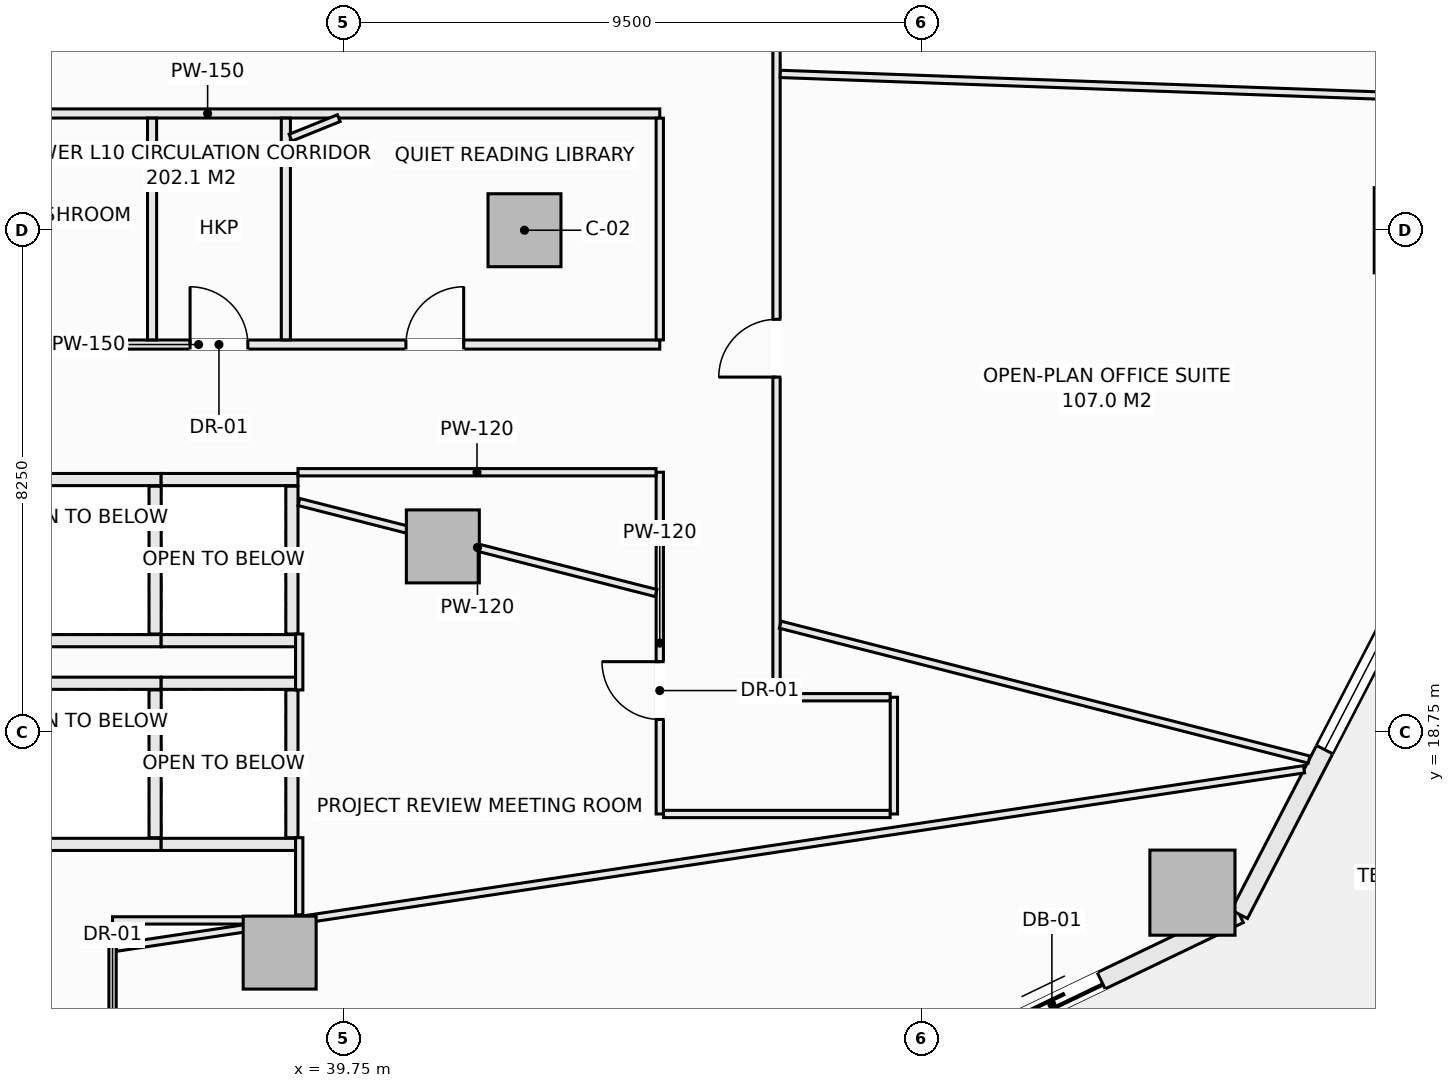
"""IFC4 building model, lengths in metres.
Left out: names, types, materials, properties, quantities, classifications, styles, units other than length and angle.
Written with IfcOpenShell. Run it as: python <this file> out.ifc"""

import sys

from ifc_helpers import new_model, si_unit, direction, frame, frame_2d, origin, origin_2d, place, context, subcontext, project, spatial, rectangle, extrude, element, fill, save


model = new_model("IFC4")
c1 = context("Model", 3, precision=1e-05, world=origin(), true_north=direction((0.0, 1.0)))
c2 = subcontext(c1, "Body", "Model", "MODEL_VIEW")
j1 = project(units=[si_unit("LENGTHUNIT", "METRE"), si_unit("PLANEANGLEUNIT", "RADIAN")], contexts=[c1])
p1 = place(None, origin())
s1 = spatial("IfcSite", under=j1, at=p1, CompositionType="ELEMENT")
p2 = place(p1, origin())
s2 = spatial("IfcBuilding", under=s1, at=p2, CompositionType="ELEMENT")
p3 = place(p2, frame((0.0, 0.0, 45.75)))
s3 = spatial("IfcBuildingStorey", under=s2, at=p3, CompositionType="ELEMENT", Elevation=45.75)
for number, where, z_axis, x_axis in (
    (1, (57.4, 27.0, -0.28), (0.0, 0.0, 1.0), (1.0, 0.0, 0.0)),
    (2, (53.71, 16.106, -0.28), (0.0, 0.0, 1.0), (1.0, 0.0, 0.0)),
):
    element("IfcColumn", number, at=place(p3, frame(where, z_axis=z_axis, x_axis=x_axis)), inside=s3, PredefinedType="COLUMN", context=c2, shape_type="SweptSolid", body=[
        extrude(rectangle(XDim=1.4, YDim=1.4, at=origin_2d()), origin(), (0.0, 0.0, 1.0), 3.85),
    ])
for number, where, z_axis, x_axis in (
    (3, (42.725, 27.0, -0.28), (0.0, 0.0, 1.0), (1.0, 0.0, 0.0)),
    (4, (38.698, 15.121, -0.28), (0.0, 0.0, 1.0), (1.0, 0.0, 0.0)),
    (5, (41.382, 21.801, -0.28), (0.0, 0.0, 1.0), (1.0, 0.0, 0.0)),
):
    element("IfcColumn", number, at=place(p3, frame(where, z_axis=z_axis, x_axis=x_axis)), inside=s3, PredefinedType="COLUMN", context=c2, shape_type="SweptSolid", body=[
        extrude(rectangle(XDim=1.2, YDim=1.2, at=origin_2d()), origin(), (0.0, 0.0, 1.0), 3.85),
    ])
p4 = place(p3, frame((48.315, 12.787, 0.0), z_axis=(0.0, 0.0, 1.0), x_axis=(0.901360393999, 0.433069786673, 0.0)))
e6 = element("IfcWall", 6, at=p4, inside=s3, PredefinedType="SOLIDWALL", context=c2, shape_type="SweptSolid", body=[
    extrude(rectangle(XDim=6.842, YDim=0.3, at=frame_2d((3.421, 0.0))), origin(), (0.0, 0.0, 1.0), 3.093),
])
p5 = place(p4, frame((2.521, 0.0, 0.0)))
e7 = element("IfcOpeningElement", 7, at=p5, cuts=e6, PredefinedType="OPENING", context=c2, shape_type="SweptSolid", body=[
    extrude(rectangle(XDim=1.8, YDim=2.25, at=frame_2d((0.9, 1.125))), frame((0.0, 0.16, 0.0), z_axis=(0.0, -1.0, 0.0), x_axis=(1.0, 0.0, 0.0)), (0.0, 0.0, 1.0), 0.32),
])
p6 = place(p3, frame((54.482, 15.75, 0.0), z_axis=(0.0, 0.0, 1.0), x_axis=(0.459809804413, 0.88801742312, 0.0)))
e8 = element("IfcWall", 8, at=p6, inside=s3, PredefinedType="SOLIDWALL", context=c2, shape_type="SweptSolid", body=[
    extrude(rectangle(XDim=6.111, YDim=0.3, at=frame_2d((3.055, 0.0))), origin(), (0.0, 0.0, 1.0), 3.093),
])
p7 = place(p6, frame((3.05, 0.0, 0.85)))
e9 = element("IfcOpeningElement", 9, at=p7, cuts=e8, PredefinedType="OPENING", context=c2, shape_type="SweptSolid", body=[
    extrude(rectangle(XDim=2.4, YDim=1.9, at=frame_2d((1.2, 0.95))), frame((0.0, 0.16, 0.0), z_axis=(0.0, -1.0, 0.0), x_axis=(1.0, 0.0, 0.0)), (0.0, 0.0, 1.0), 0.32),
])
p8 = place(p3, frame((50.959, 10.678, 0.0), z_axis=(0.0, 0.0, 1.0), x_axis=(0.873500119739, 0.48682393205, 0.0)))
e10 = element("IfcWall", 10, at=p8, inside=s3, PredefinedType="PARAPET", context=c2, shape_type="SweptSolid", body=[
    extrude(rectangle(XDim=7.562, YDim=0.22, at=frame_2d((3.781, 0.0))), origin(), (0.0, 0.0, 1.0), 0.52),
])
for number, where, z_axis, x_axis in (
    (11, (34.5, 19.55, 0.0), (0.0, 0.0, 1.0), (1.0, 0.0, 0.0)),
    (12, (34.5, 16.9, 0.0), (0.0, 0.0, 1.0), (1.0, 0.0, 0.0)),
):
    element("IfcWall", number, at=place(p3, frame(where, z_axis=z_axis, x_axis=x_axis)), inside=s3, PredefinedType="SOLIDWALL", context=c2, shape_type="SweptSolid", body=[
        extrude(rectangle(XDim=2.25, YDim=0.2, at=frame_2d((1.125, 0.0))), origin(), (0.0, 0.0, 1.0), 3.57),
    ])
p9 = place(p3, frame((36.65, 17.01, 0.0), z_axis=(0.0, 0.0, 1.0), x_axis=(0.0, 1.0, 0.0)))
e13 = element("IfcWall", 13, at=p9, inside=s3, PredefinedType="SOLIDWALL", context=c2, shape_type="SweptSolid", body=[
    extrude(rectangle(XDim=2.43, YDim=0.2, at=frame_2d((1.215, 0.0))), origin(), (0.0, 0.0, 1.0), 3.57),
])
for number, where, z_axis, x_axis in (
    (14, (36.75, 19.55, 0.0), (0.0, 0.0, 1.0), (1.0, 0.0, 0.0)),
    (15, (36.75, 16.9, 0.0), (0.0, 0.0, 1.0), (1.0, 0.0, 0.0)),
):
    element("IfcWall", number, at=place(p3, frame(where, z_axis=z_axis, x_axis=x_axis)), inside=s3, PredefinedType="SOLIDWALL", context=c2, shape_type="SweptSolid", body=[
        extrude(rectangle(XDim=2.25, YDim=0.2, at=frame_2d((1.125, 0.0))), origin(), (0.0, 0.0, 1.0), 3.57),
    ])
p10 = place(p3, frame((38.9, 17.01, 0.0), z_axis=(0.0, 0.0, 1.0), x_axis=(0.0, 1.0, 0.0)))
e16 = element("IfcWall", 16, at=p10, inside=s3, PredefinedType="SOLIDWALL", context=c2, shape_type="SweptSolid", body=[
    extrude(rectangle(XDim=2.43, YDim=0.2, at=frame_2d((1.215, 0.0))), origin(), (0.0, 0.0, 1.0), 3.57),
])
for number, where, z_axis, x_axis in (
    (17, (34.5, 22.9, 0.0), (0.0, 0.0, 1.0), (1.0, 0.0, 0.0)),
    (18, (34.5, 20.25, 0.0), (0.0, 0.0, 1.0), (1.0, 0.0, 0.0)),
):
    element("IfcWall", number, at=place(p3, frame(where, z_axis=z_axis, x_axis=x_axis)), inside=s3, PredefinedType="SOLIDWALL", context=c2, shape_type="SweptSolid", body=[
        extrude(rectangle(XDim=2.25, YDim=0.2, at=frame_2d((1.125, 0.0))), origin(), (0.0, 0.0, 1.0), 3.57),
    ])
p11 = place(p3, frame((36.65, 20.36, 0.0), z_axis=(0.0, 0.0, 1.0), x_axis=(0.0, 1.0, 0.0)))
e19 = element("IfcWall", 19, at=p11, inside=s3, PredefinedType="SOLIDWALL", context=c2, shape_type="SweptSolid", body=[
    extrude(rectangle(XDim=2.43, YDim=0.2, at=frame_2d((1.215, 0.0))), origin(), (0.0, 0.0, 1.0), 3.57),
])
for number, where, z_axis, x_axis in (
    (20, (36.75, 22.9, 0.0), (0.0, 0.0, 1.0), (1.0, 0.0, 0.0)),
    (21, (36.75, 20.25, 0.0), (0.0, 0.0, 1.0), (1.0, 0.0, 0.0)),
):
    element("IfcWall", number, at=place(p3, frame(where, z_axis=z_axis, x_axis=x_axis)), inside=s3, PredefinedType="SOLIDWALL", context=c2, shape_type="SweptSolid", body=[
        extrude(rectangle(XDim=2.25, YDim=0.2, at=frame_2d((1.125, 0.0))), origin(), (0.0, 0.0, 1.0), 3.57),
    ])
p12 = place(p3, frame((38.9, 20.36, 0.0), z_axis=(0.0, 0.0, 1.0), x_axis=(0.0, 1.0, 0.0)))
e22 = element("IfcWall", 22, at=p12, inside=s3, PredefinedType="SOLIDWALL", context=c2, shape_type="SweptSolid", body=[
    extrude(rectangle(XDim=2.43, YDim=0.2, at=frame_2d((1.215, 0.0))), origin(), (0.0, 0.0, 1.0), 3.57),
])
p13 = place(p3, frame((29.78, 25.12, 0.0), z_axis=(0.0, 0.0, 1.0), x_axis=(1.0, 0.0, 0.0)))
e23 = element("IfcWall", 23, at=p13, inside=s3, PredefinedType="PARTITIONING", context=c2, shape_type="SweptSolid", body=[
    extrude(rectangle(XDim=15.17, YDim=0.15, at=frame_2d((7.585, 0.0))), origin(), (0.0, 0.0, 1.0), 3.57),
])
p14 = place(p13, frame((3.14, 0.0, 0.0)))
e24 = element("IfcOpeningElement", 24, at=p14, cuts=e23, PredefinedType="OPENING", context=c2, shape_type="SweptSolid", body=[
    extrude(rectangle(XDim=0.95, YDim=2.1, at=frame_2d((0.475, 1.05))), frame((0.0, 0.085, 0.0), z_axis=(0.0, -1.0, 0.0), x_axis=(1.0, 0.0, 0.0)), (0.0, 0.0, 1.0), 0.17),
])
p15 = place(p13, frame((7.445, 0.0, 0.0)))
e25 = element("IfcOpeningElement", 25, at=p15, cuts=e23, PredefinedType="OPENING", context=c2, shape_type="SweptSolid", body=[
    extrude(rectangle(XDim=0.95, YDim=2.1, at=frame_2d((0.475, 1.05))), frame((0.0, 0.085, 0.0), z_axis=(0.0, -1.0, 0.0), x_axis=(1.0, 0.0, 0.0)), (0.0, 0.0, 1.0), 0.17),
])
p16 = place(p13, frame((10.995, 0.0, 0.0)))
e26 = element("IfcOpeningElement", 26, at=p16, cuts=e23, PredefinedType="OPENING", context=c2, shape_type="SweptSolid", body=[
    extrude(rectangle(XDim=0.95, YDim=2.1, at=frame_2d((0.475, 1.05))), frame((0.0, 0.085, 0.0), z_axis=(0.0, -1.0, 0.0), x_axis=(1.0, 0.0, 0.0)), (0.0, 0.0, 1.0), 0.17),
])
p17 = place(p3, frame((30.077, 28.92, 0.0), z_axis=(0.0, 0.0, 1.0), x_axis=(1.0, 0.0, 0.0)))
e27 = element("IfcWall", 27, at=p17, inside=s3, PredefinedType="PARTITIONING", context=c2, shape_type="SweptSolid", body=[
    extrude(rectangle(XDim=14.873, YDim=0.15, at=frame_2d((7.437, 0.0))), origin(), (0.0, 0.0, 1.0), 3.57),
])
for number, where, z_axis, x_axis in (
    (28, (36.6, 25.197, 0.0), (0.0, 0.0, 1.0), (0.0, 1.0, 0.0)),
    (29, (38.8, 25.197, 0.0), (0.0, 0.0, 1.0), (0.0, 1.0, 0.0)),
):
    element("IfcWall", number, at=place(p3, frame(where, z_axis=z_axis, x_axis=x_axis)), inside=s3, PredefinedType="PARTITIONING", context=c2, shape_type="SweptSolid", body=[
        extrude(rectangle(XDim=3.646, YDim=0.15, at=frame_2d((1.823, 0.0))), origin(), (0.0, 0.0, 1.0), 3.57),
    ])
p18 = place(p3, frame((35.95, 15.65, 0.0), z_axis=(0.0, 0.0, 1.0), x_axis=(1.0, 0.0, 0.0)))
e30 = element("IfcWall", 30, at=p18, inside=s3, PredefinedType="PARTITIONING", context=c2, shape_type="SweptSolid", body=[
    extrude(rectangle(XDim=2.291, YDim=0.12, at=frame_2d((1.146, 0.0))), origin(), (0.0, 0.0, 1.0), 3.57),
])
p19 = place(p3, frame((35.95, 11.75, 0.0), z_axis=(0.0, 0.0, 1.0), x_axis=(0.0, 1.0, 0.0)))
e31 = element("IfcWall", 31, at=p19, inside=s3, PredefinedType="PARTITIONING", context=c2, shape_type="SweptSolid", body=[
    extrude(rectangle(XDim=3.838, YDim=0.12, at=frame_2d((1.919, 0.0))), origin(), (0.0, 0.0, 1.0), 3.57),
])
p20 = place(p19, frame((1.376, 0.0, 0.0)))
e32 = element("IfcOpeningElement", 32, at=p20, cuts=e31, PredefinedType="OPENING", context=c2, shape_type="SweptSolid", body=[
    extrude(rectangle(XDim=0.95, YDim=2.1, at=frame_2d((0.475, 1.05))), frame((0.0, 0.07, 0.0), z_axis=(0.0, -1.0, 0.0), x_axis=(1.0, 0.0, 0.0)), (0.0, 0.0, 1.0), 0.14),
])
p21 = place(p3, frame((44.95, 17.4, 0.0), z_axis=(0.0, 0.0, 1.0), x_axis=(0.0, 1.0, 0.0)))
e33 = element("IfcWall", 33, at=p21, inside=s3, PredefinedType="PARTITIONING", context=c2, shape_type="SweptSolid", body=[
    extrude(rectangle(XDim=5.62, YDim=0.12, at=frame_2d((2.81, 0.0))), origin(), (0.0, 0.0, 1.0), 3.57),
])
p22 = place(p21, frame((1.555, 0.0, 0.0)))
e34 = element("IfcOpeningElement", 34, at=p22, cuts=e33, PredefinedType="OPENING", context=c2, shape_type="SweptSolid", body=[
    extrude(rectangle(XDim=0.95, YDim=2.1, at=frame_2d((0.475, 1.05))), frame((0.0, 0.07, 0.0), z_axis=(0.0, -1.0, 0.0), x_axis=(1.0, 0.0, 0.0)), (0.0, 0.0, 1.0), 0.14),
])
p23 = place(p3, frame((44.95, 25.197, 0.0), z_axis=(0.0, 0.0, 1.0), x_axis=(0.0, 1.0, 0.0)))
e35 = element("IfcWall", 35, at=p23, inside=s3, PredefinedType="PARTITIONING", context=c2, shape_type="SweptSolid", body=[
    extrude(rectangle(XDim=3.646, YDim=0.12, at=frame_2d((1.823, 0.0))), origin(), (0.0, 0.0, 1.0), 3.57),
])
p24 = place(p3, frame((48.8, 17.4, 0.0), z_axis=(0.0, 0.0, 1.0), x_axis=(0.0, 1.0, 0.0)))
e36 = element("IfcWall", 36, at=p24, inside=s3, PredefinedType="PARTITIONING", context=c2, shape_type="SweptSolid", body=[
    extrude(rectangle(XDim=1.92, YDim=0.12, at=frame_2d((0.96, 0.0))), origin(), (0.0, 0.0, 1.0), 3.57),
])
p25 = place(p3, frame((46.87, 19.32, 0.0), z_axis=(0.0, 0.0, 1.0), x_axis=(0.0, 1.0, 0.0)))
e37 = element("IfcWall", 37, at=p25, inside=s3, PredefinedType="PARTITIONING", context=c2, shape_type="SweptSolid", body=[
    extrude(rectangle(XDim=14.798, YDim=0.12, at=frame_2d((7.399, 0.0))), origin(), (0.0, 0.0, 1.0), 3.57),
])
p26 = place(p25, frame((5.265, 0.0, 0.0)))
e38 = element("IfcOpeningElement", 38, at=p26, cuts=e37, PredefinedType="OPENING", context=c2, shape_type="SweptSolid", body=[
    extrude(rectangle(XDim=0.95, YDim=2.1, at=frame_2d((0.475, 1.05))), frame((0.0, 0.07, 0.0), z_axis=(0.0, -1.0, 0.0), x_axis=(1.0, 0.0, 0.0)), (0.0, 0.0, 1.0), 0.14),
])
p27 = place(p25, frame((11.845, 0.0, 0.0)))
e39 = element("IfcOpeningElement", 39, at=p27, cuts=e37, PredefinedType="OPENING", context=c2, shape_type="SweptSolid", body=[
    extrude(rectangle(XDim=0.95, YDim=2.1, at=frame_2d((0.475, 1.05))), frame((0.0, 0.07, 0.0), z_axis=(0.0, -1.0, 0.0), x_axis=(1.0, 0.0, 0.0)), (0.0, 0.0, 1.0), 0.14),
])
p28 = place(p3, frame((46.932, 19.32, 0.0), z_axis=(0.0, 0.0, 1.0), x_axis=(1.0, 0.0, 0.0)))
e40 = element("IfcWall", 40, at=p28, inside=s3, PredefinedType="PARTITIONING", context=c2, shape_type="SweptSolid", body=[
    extrude(rectangle(XDim=1.806, YDim=0.12, at=frame_2d((0.903, 0.0))), origin(), (0.0, 0.0, 1.0), 3.205),
])
p29 = place(p3, frame((45.012, 17.4, 0.0), z_axis=(0.0, 0.0, 1.0), x_axis=(1.0, 0.0, 0.0)))
e41 = element("IfcWall", 41, at=p29, inside=s3, PredefinedType="PARTITIONING", context=c2, shape_type="SweptSolid", body=[
    extrude(rectangle(XDim=3.726, YDim=0.12, at=frame_2d((1.863, 0.0))), origin(), (0.0, 0.0, 1.0), 3.57),
])
p30 = place(p3, frame((39.0, 23.02, 0.0), z_axis=(0.0, 0.0, 1.0), x_axis=(1.0, 0.0, 0.0)))
e42 = element("IfcWall", 42, at=p30, inside=s3, PredefinedType="PARTITIONING", context=c2, shape_type="SweptSolid", body=[
    extrude(rectangle(XDim=5.888, YDim=0.12, at=frame_2d((2.944, 0.0))), origin(), (0.0, 0.0, 1.0), 3.57),
])
p31 = place(p3, frame((39.02, 15.742, 0.0), z_axis=(0.0, 0.0, 1.0), x_axis=(0.0, 1.0, 0.0)))
e43 = element("IfcWall", 43, at=p31, inside=s3, PredefinedType="PARTITIONING", context=c2, shape_type="SweptSolid", body=[
    extrude(rectangle(XDim=1.268, YDim=0.12, at=frame_2d((0.634, 0.0))), origin(), (0.0, 0.0, 1.0), 2.934),
])
p32 = place(p3, frame((39.02, 19.44, 0.0), z_axis=(0.0, 0.0, 1.0), x_axis=(0.0, 1.0, 0.0)))
e44 = element("IfcWall", 44, at=p32, inside=s3, PredefinedType="PARTITIONING", context=c2, shape_type="SweptSolid", body=[
    extrude(rectangle(XDim=0.92, YDim=0.12, at=frame_2d((0.46, 0.0))), origin(), (0.0, 0.0, 1.0), 3.57),
])
p33 = place(p3, frame((39.015, 22.531, 0.0), z_axis=(0.0, 0.0, 1.0), x_axis=(0.968999219603, -0.247063782066, 0.0)))
e45 = element("IfcWall", 45, at=p33, inside=s3, PredefinedType="PARTITIONING", context=c2, shape_type="SweptSolid", body=[
    extrude(rectangle(XDim=6.061, YDim=0.12, at=frame_2d((3.03, 0.0))), origin(), (0.0, 0.0, 1.0), 3.205),
])
p34 = place(p3, frame((46.932, 20.512, 0.0), z_axis=(0.0, 0.0, 1.0), x_axis=(0.969002278344, -0.247051785187, 0.0)))
e46 = element("IfcWall", 46, at=p34, inside=s3, PredefinedType="PARTITIONING", context=c2, shape_type="SweptSolid", body=[
    extrude(rectangle(XDim=8.975, YDim=0.12, at=frame_2d((4.488, 0.0))), origin(), (0.0, 0.0, 1.0), 3.57),
])
p35 = place(p3, frame((36.012, 15.202, 0.0), z_axis=(0.0, 0.0, 1.0), x_axis=(0.988905340033, 0.148547058049, 0.0)))
e47 = element("IfcWall", 47, at=p35, inside=s3, PredefinedType="PARTITIONING", context=c2, shape_type="SweptSolid", body=[
    extrude(rectangle(XDim=2.196, YDim=0.12, at=frame_2d((1.098, 0.0))), origin(), (0.0, 0.0, 1.0), 2.934),
])
p36 = place(p3, frame((38.241, 15.537, 0.0), z_axis=(0.0, 0.0, 1.0), x_axis=(0.988910037188, 0.148515784849, 0.0)))
e48 = element("IfcWall", 48, at=p36, inside=s3, PredefinedType="PARTITIONING", context=c2, shape_type="SweptSolid", body=[
    extrude(rectangle(XDim=17.499, YDim=0.12, at=frame_2d((8.75, 0.0))), origin(), (0.0, 0.0, 1.0), 3.205),
])
p37 = place(p3, frame((46.932, 29.571, 0.0), z_axis=(0.0, 0.0, 1.0), x_axis=(0.999348798182, -0.036082954031, 0.0)))
e49 = element("IfcWall", 49, at=p37, inside=s3, PredefinedType="PARTITIONING", context=c2, shape_type="SweptSolid", body=[
    extrude(rectangle(XDim=10.812, YDim=0.12, at=frame_2d((5.406, 0.0))), origin(), (0.0, 0.0, 1.0), 3.57),
])
p38 = place(p3, frame((38.877, 28.522, 0.0), z_axis=(0.0, 0.0, 1.0), x_axis=(0.927133255937, 0.374731805076, 0.0)))
e50 = element("IfcWall", 50, at=p38, inside=s3, PredefinedType="PARTITIONING", context=c2, shape_type="SweptSolid", body=[
    extrude(rectangle(XDim=0.856, YDim=0.12, at=frame_2d((0.428, 0.0))), origin(), (0.0, 0.0, 1.0), 3.57),
])
p39 = place(p5, frame((1.8, 0.0, 0.0), z_axis=(0.0, 0.0, 1.0), x_axis=(-1.0, 0.0, 0.0)))
e51 = element("IfcDoor", 51, at=p39, inside=s3, OperationType="SLIDING_TO_LEFT", PredefinedType="DOOR", context=c2, shape_type="SweptSolid", body=[
    extrude(rectangle(XDim=1.8, YDim=2.25, at=frame_2d((0.9, 1.125))), frame((0.0, 0.025, 0.0), z_axis=(0.0, -1.0, 0.0), x_axis=(1.0, 0.0, 0.0)), (0.0, 0.0, 1.0), 0.05),
])
fill(e7, e51)
p40 = place(p7, origin())
e52 = element("IfcWindow", 52, at=p40, inside=s3, PartitioningType="SINGLE_PANEL", PredefinedType="WINDOW", context=c2, shape_type="SweptSolid", body=[
    extrude(rectangle(XDim=2.4, YDim=1.9, at=frame_2d((1.2, 0.95))), frame((0.0, 0.03, 0.0), z_axis=(0.0, -1.0, 0.0), x_axis=(1.0, 0.0, 0.0)), (0.0, 0.0, 1.0), 0.06),
])
fill(e9, e52)
p41 = place(p15, origin())
e53 = element("IfcDoor", 53, at=p41, inside=s3, OperationType="SINGLE_SWING_LEFT", PredefinedType="DOOR", context=c2, shape_type="SweptSolid", body=[
    extrude(rectangle(XDim=0.95, YDim=2.1, at=frame_2d((0.475, 1.05))), frame((0.0, 0.025, 0.0), z_axis=(0.0, -1.0, 0.0), x_axis=(1.0, 0.0, 0.0)), (0.0, 0.0, 1.0), 0.05),
])
fill(e25, e53)
p42 = place(p22, origin())
e54 = element("IfcDoor", 54, at=p42, inside=s3, OperationType="SINGLE_SWING_RIGHT", PredefinedType="DOOR", context=c2, shape_type="SweptSolid", body=[
    extrude(rectangle(XDim=0.95, YDim=2.1, at=frame_2d((0.475, 1.05))), frame((0.0, 0.025, 0.0), z_axis=(0.0, -1.0, 0.0), x_axis=(1.0, 0.0, 0.0)), (0.0, 0.0, 1.0), 0.05),
])
fill(e34, e54)
p43 = place(p26, origin())
e55 = element("IfcDoor", 55, at=p43, inside=s3, OperationType="SINGLE_SWING_LEFT", PredefinedType="DOOR", context=c2, shape_type="SweptSolid", body=[
    extrude(rectangle(XDim=0.95, YDim=2.1, at=frame_2d((0.475, 1.05))), frame((0.0, 0.025, 0.0), z_axis=(0.0, -1.0, 0.0), x_axis=(1.0, 0.0, 0.0)), (0.0, 0.0, 1.0), 0.05),
])
fill(e38, e55)
p44 = place(p16, origin())
e56 = element("IfcDoor", 56, at=p44, inside=s3, OperationType="SINGLE_SWING_RIGHT", PredefinedType="DOOR", context=c2, shape_type="SweptSolid", body=[
    extrude(rectangle(XDim=0.95, YDim=2.1, at=frame_2d((0.475, 1.05))), frame((0.0, 0.025, 0.0), z_axis=(0.0, -1.0, 0.0), x_axis=(1.0, 0.0, 0.0)), (0.0, 0.0, 1.0), 0.05),
])
fill(e26, e56)
save(model, sys.argv[1])
